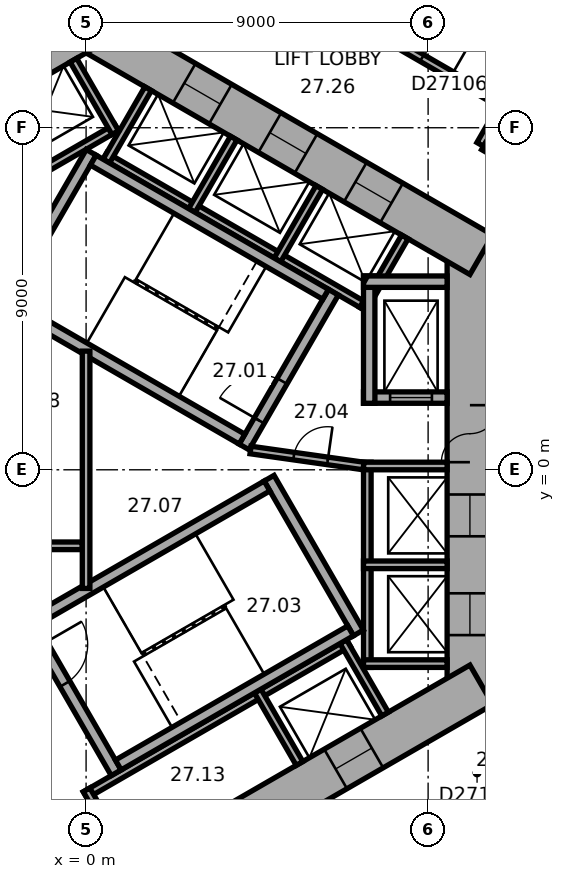
"""IFC4 building model, lengths in metres.
Left out: names, types, materials, properties, quantities, classifications, styles, units other than length and angle.
Written with IfcOpenShell. Run it as: python <this file> out.ifc"""

import sys

from ifc_helpers import new_model, si_unit, direction, frame, frame_2d, origin, place, context, subcontext, project, spatial, rectangle, extrude, element, fill, save


model = new_model("IFC4")
c1 = context("Model", 3, precision=1e-05, world=origin(), true_north=direction((0.0, 1.0)))
c2 = subcontext(c1, "Body", "Model", "MODEL_VIEW")
j1 = project(units=[si_unit("LENGTHUNIT", "METRE"), si_unit("PLANEANGLEUNIT", "RADIAN")], contexts=[c1])
p1 = place(None, origin())
s1 = spatial("IfcSite", under=j1, at=p1, CompositionType="ELEMENT")
p2 = place(p1, origin())
s2 = spatial("IfcBuilding", under=s1, at=p2, CompositionType="ELEMENT")
p3 = place(p2, frame((0.0, 0.0, 113.3)))
s3 = spatial("IfcBuildingStorey", under=s2, at=p3, CompositionType="ELEMENT", Elevation=113.3)
p4 = place(p3, frame((10.1, -6.177, 0.0), z_axis=(0.0, 0.0, 1.0), x_axis=(0.0, 1.0, 0.0)))
e1 = element("IfcWall", 1, at=p4, inside=s3, PredefinedType="SHEAR", context=c2, shape_type="SweptSolid", body=[
    extrude(rectangle(XDim=12.355, YDim=1.2, at=frame_2d((6.177, 0.0))), origin(), (0.0, 0.0, 1.0), 3.3),
])
p5 = place(p4, frame((6.378, 0.0, 0.0)))
e2 = element("IfcOpeningElement", 2, at=p5, cuts=e1, PredefinedType="OPENING", context=c2, shape_type="SweptSolid", body=[
    extrude(rectangle(XDim=1.5, YDim=2.1, at=frame_2d((0.75, 1.05))), frame((0.0, 0.61, 0.0), z_axis=(0.0, -1.0, 0.0), x_axis=(1.0, 0.0, 0.0)), (0.0, 0.0, 1.0), 1.22),
])
p6 = place(p4, frame((1.828, 0.0, 0.0)))
e3 = element("IfcOpeningElement", 3, at=p6, cuts=e1, PredefinedType="OPENING", context=c2, shape_type="SweptSolid", body=[
    extrude(rectangle(XDim=1.1, YDim=2.1, at=frame_2d((0.55, 1.05))), frame((0.0, 0.61, 0.0), z_axis=(0.0, -1.0, 0.0), x_axis=(1.0, 0.0, 0.0)), (0.0, 0.0, 1.0), 1.22),
])
p7 = place(p4, frame((4.427, 0.0, 0.0)))
e4 = element("IfcOpeningElement", 4, at=p7, cuts=e1, PredefinedType="OPENING", context=c2, shape_type="SweptSolid", body=[
    extrude(rectangle(XDim=1.1, YDim=2.1, at=frame_2d((0.55, 1.05))), frame((0.0, 0.61, 0.0), z_axis=(0.0, -1.0, 0.0), x_axis=(1.0, 0.0, 0.0)), (0.0, 0.0, 1.0), 1.22),
])
p8 = place(p3, frame((10.4, 5.658, 0.0), z_axis=(0.0, 0.0, 1.0), x_axis=(-0.866021384402, 0.500006961711, 0.0)))
e5 = element("IfcWall", 5, at=p8, inside=s3, PredefinedType="SHEAR", context=c2, shape_type="SweptSolid", body=[
    extrude(rectangle(XDim=12.355, YDim=1.2, at=frame_2d((6.178, 0.0))), origin(), (0.0, 0.0, 1.0), 3.3),
])
p9 = place(p8, frame((2.728, 0.0, 0.0)))
e6 = element("IfcOpeningElement", 6, at=p9, cuts=e5, PredefinedType="OPENING", context=c2, shape_type="SweptSolid", body=[
    extrude(rectangle(XDim=1.1, YDim=2.1, at=frame_2d((0.55, 1.05))), frame((0.0, 0.61, 0.0), z_axis=(0.0, -1.0, 0.0), x_axis=(1.0, 0.0, 0.0)), (0.0, 0.0, 1.0), 1.22),
])
p10 = place(p8, frame((5.328, 0.0, 0.0)))
e7 = element("IfcOpeningElement", 7, at=p10, cuts=e5, PredefinedType="OPENING", context=c2, shape_type="SweptSolid", body=[
    extrude(rectangle(XDim=1.1, YDim=2.1, at=frame_2d((0.55, 1.05))), frame((0.0, 0.61, 0.0), z_axis=(0.0, -1.0, 0.0), x_axis=(1.0, 0.0, 0.0)), (0.0, 0.0, 1.0), 1.22),
])
p11 = place(p8, frame((7.928, 0.0, 0.0)))
e8 = element("IfcOpeningElement", 8, at=p11, cuts=e5, PredefinedType="OPENING", context=c2, shape_type="SweptSolid", body=[
    extrude(rectangle(XDim=1.1, YDim=2.1, at=frame_2d((0.55, 1.05))), frame((0.0, 0.61, 0.0), z_axis=(0.0, -1.0, 0.0), x_axis=(1.0, 0.0, 0.0)), (0.0, 0.0, 1.0), 1.22),
])
p12 = place(p3, frame((0.3, 11.836, 0.0), z_axis=(0.0, 0.0, 1.0), x_axis=(-0.866021384402, -0.500006961711, 0.0)))
e9 = element("IfcWall", 9, at=p12, inside=s3, PredefinedType="SHEAR", context=c2, shape_type="SweptSolid", body=[
    extrude(rectangle(XDim=12.355, YDim=1.2, at=frame_2d((6.178, 0.0))), origin(), (0.0, 0.0, 1.0), 3.3),
])
p13 = place(p12, frame((6.378, 0.0, 0.0)))
e10 = element("IfcOpeningElement", 10, at=p13, cuts=e9, PredefinedType="OPENING", context=c2, shape_type="SweptSolid", body=[
    extrude(rectangle(XDim=1.5, YDim=2.1, at=frame_2d((0.75, 1.05))), frame((0.0, 0.61, 0.0), z_axis=(0.0, -1.0, 0.0), x_axis=(1.0, 0.0, 0.0)), (0.0, 0.0, 1.0), 1.22),
])
p14 = place(p12, frame((1.828, 0.0, 0.0)))
e11 = element("IfcOpeningElement", 11, at=p14, cuts=e9, PredefinedType="OPENING", context=c2, shape_type="SweptSolid", body=[
    extrude(rectangle(XDim=1.1, YDim=2.1, at=frame_2d((0.55, 1.05))), frame((0.0, 0.61, 0.0), z_axis=(0.0, -1.0, 0.0), x_axis=(1.0, 0.0, 0.0)), (0.0, 0.0, 1.0), 1.22),
])
p15 = place(p3, frame((-10.4, -5.658, 0.0), z_axis=(0.0, 0.0, 1.0), x_axis=(0.866021384402, -0.500006961711, 0.0)))
e12 = element("IfcWall", 12, at=p15, inside=s3, PredefinedType="SHEAR", context=c2, shape_type="SweptSolid", body=[
    extrude(rectangle(XDim=12.355, YDim=1.2, at=frame_2d((6.178, 0.0))), origin(), (0.0, 0.0, 1.0), 3.3),
])
p16 = place(p15, frame((6.378, 0.0, 0.0)))
e13 = element("IfcOpeningElement", 13, at=p16, cuts=e12, PredefinedType="OPENING", context=c2, shape_type="SweptSolid", body=[
    extrude(rectangle(XDim=1.5, YDim=2.1, at=frame_2d((0.75, 1.05))), frame((0.0, 0.61, 0.0), z_axis=(0.0, -1.0, 0.0), x_axis=(1.0, 0.0, 0.0)), (0.0, 0.0, 1.0), 1.22),
])
p17 = place(p15, frame((3.228, 0.0, 0.0)))
e14 = element("IfcOpeningElement", 14, at=p17, cuts=e12, PredefinedType="OPENING", context=c2, shape_type="SweptSolid", body=[
    extrude(rectangle(XDim=0.9, YDim=2.1, at=frame_2d((0.45, 1.05))), frame((0.0, 0.61, 0.0), z_axis=(0.0, -1.0, 0.0), x_axis=(1.0, 0.0, 0.0)), (0.0, 0.0, 1.0), 1.22),
])
p18 = place(p3, frame((-0.3, -11.836, 0.0), z_axis=(0.0, 0.0, 1.0), x_axis=(0.866021384402, 0.500006961711, 0.0)))
e15 = element("IfcWall", 15, at=p18, inside=s3, PredefinedType="SHEAR", context=c2, shape_type="SweptSolid", body=[
    extrude(rectangle(XDim=12.355, YDim=1.2, at=frame_2d((6.178, 0.0))), origin(), (0.0, 0.0, 1.0), 3.3),
])
p19 = place(p18, frame((4.128, 0.0, 0.0)))
e16 = element("IfcOpeningElement", 16, at=p19, cuts=e15, PredefinedType="OPENING", context=c2, shape_type="SweptSolid", body=[
    extrude(rectangle(XDim=0.9, YDim=2.1, at=frame_2d((0.45, 1.05))), frame((0.0, 0.61, 0.0), z_axis=(0.0, -1.0, 0.0), x_axis=(1.0, 0.0, 0.0)), (0.0, 0.0, 1.0), 1.22),
])
p20 = place(p18, frame((7.928, 0.0, 0.0)))
e17 = element("IfcOpeningElement", 17, at=p20, cuts=e15, PredefinedType="OPENING", context=c2, shape_type="SweptSolid", body=[
    extrude(rectangle(XDim=1.1, YDim=2.1, at=frame_2d((0.55, 1.05))), frame((0.0, 0.61, 0.0), z_axis=(0.0, -1.0, 0.0), x_axis=(1.0, 0.0, 0.0)), (0.0, 0.0, 1.0), 1.22),
])
p21 = place(p3, frame((7.4, -5.2, 0.0), z_axis=(0.0, 0.0, 1.0), x_axis=(0.0, 1.0, 0.0)))
e18 = element("IfcWall", 18, at=p21, inside=s3, PredefinedType="PARTITIONING", context=c2, shape_type="SweptSolid", body=[
    extrude(rectangle(XDim=5.4, YDim=0.2, at=frame_2d((2.7, 0.0))), origin(), (0.0, 0.0, 1.0), 3.05),
])
for number, where, z_axis, x_axis in (
    (19, (7.3, -5.1, 0.0), (0.0, 0.0, 1.0), (1.0, 0.0, 0.0)),
    (20, (7.3, -2.5, 0.0), (0.0, 0.0, 1.0), (1.0, 0.0, 0.0)),
    (21, (7.3, 0.1, 0.0), (0.0, 0.0, 1.0), (1.0, 0.0, 0.0)),
):
    element("IfcWall", number, at=place(p3, frame(where, z_axis=z_axis, x_axis=x_axis)), inside=s3, PredefinedType="PARTITIONING", context=c2, shape_type="SweptSolid", body=[
        extrude(rectangle(XDim=2.2, YDim=0.2, at=frame_2d((1.1, 0.0))), origin(), (0.0, 0.0, 1.0), 3.05),
    ])
p22 = place(p3, frame((7.424, 4.259, 0.0), z_axis=(0.0, 0.0, 1.0), x_axis=(-0.866026010844, 0.49999894854, 0.0)))
e22 = element("IfcWall", 22, at=p22, inside=s3, PredefinedType="PARTITIONING", context=c2, shape_type="SweptSolid", body=[
    extrude(rectangle(XDim=8.0, YDim=0.2, at=frame_2d((4.0, 0.0))), origin(), (0.0, 0.0, 1.0), 3.05),
])
for number, where, z_axis, x_axis in (
    (23, (7.287, 4.222, 0.0), (0.0, 0.0, 1.0), (0.5, 0.866, 0.0)),
    (24, (5.036, 5.522, 0.0), (0.0, 0.0, 1.0), (0.5, 0.866, 0.0)),
    (25, (2.784, 6.822, 0.0), (0.0, 0.0, 1.0), (0.5, 0.866, 0.0)),
    (26, (0.532, 8.122, 0.0), (0.0, 0.0, 1.0), (0.5, 0.866, 0.0)),
):
    element("IfcWall", number, at=place(p3, frame(where, z_axis=z_axis, x_axis=x_axis)), inside=s3, PredefinedType="PARTITIONING", context=c2, shape_type="SweptSolid", body=[
        extrude(rectangle(XDim=2.2, YDim=0.2, at=frame_2d((1.1, 0.0))), origin(), (0.0, 0.0, 1.0), 3.05),
    ])
p23 = place(p3, frame((0.803, 9.009, 0.0), z_axis=(0.0, 0.0, 1.0), x_axis=(-0.866028230842, -0.499995103361, 0.0)))
e27 = element("IfcWall", 27, at=p23, inside=s3, PredefinedType="PARTITIONING", context=c2, shape_type="SweptSolid", body=[
    extrude(rectangle(XDim=5.4, YDim=0.2, at=frame_2d((2.7, 0.0))), origin(), (0.0, 0.0, 1.0), 3.05),
])
p24 = place(p3, frame((0.767, 8.872, 0.0), z_axis=(0.0, 0.0, 1.0), x_axis=(-0.499994660107, 0.866028486751, 0.0)))
e28 = element("IfcWall", 28, at=p24, inside=s3, PredefinedType="PARTITIONING", context=c2, shape_type="SweptSolid", body=[
    extrude(rectangle(XDim=2.2, YDim=0.2, at=frame_2d((1.1, 0.0))), origin(), (0.0, 0.0, 1.0), 3.05),
])
p25 = place(p3, frame((-0.024, -8.559, 0.0), z_axis=(0.0, 0.0, 1.0), x_axis=(0.866026010844, 0.49999894854, 0.0)))
e29 = element("IfcWall", 29, at=p25, inside=s3, PredefinedType="PARTITIONING", context=c2, shape_type="SweptSolid", body=[
    extrude(rectangle(XDim=8.0, YDim=0.2, at=frame_2d((4.0, 0.0))), origin(), (0.0, 0.0, 1.0), 3.05),
])
for number, where, z_axis, x_axis in (
    (30, (0.013, -8.422, 0.0), (0.0, 0.0, 1.0), (0.5, -0.866, 0.0)),
    (31, (4.516, -5.822, 0.0), (0.0, 0.0, 1.0), (0.5, -0.866, 0.0)),
    (32, (6.768, -4.522, 0.0), (0.0, 0.0, 1.0), (0.5, -0.866, 0.0)),
):
    element("IfcWall", number, at=place(p3, frame(where, z_axis=z_axis, x_axis=x_axis)), inside=s3, PredefinedType="PARTITIONING", context=c2, shape_type="SweptSolid", body=[
        extrude(rectangle(XDim=2.2, YDim=0.2, at=frame_2d((1.1, 0.0))), origin(), (0.0, 0.0, 1.0), 3.05),
    ])
p26 = place(p3, frame((4.158, 0.602, 0.0), z_axis=(0.0, 0.0, 1.0), x_axis=(0.499977259774, 0.866038532462, 0.0)))
e33 = element("IfcWall", 33, at=p26, inside=s3, PredefinedType="SHEAR", context=c2, shape_type="SweptSolid", body=[
    extrude(rectangle(XDim=4.7, YDim=0.3, at=frame_2d((2.35, 0.0))), origin(), (0.0, 0.0, 1.0), 3.05),
])
p27 = place(p26, frame((0.8, 0.0, 0.0)))
e34 = element("IfcOpeningElement", 34, at=p27, cuts=e33, PredefinedType="OPENING", context=c2, shape_type="SweptSolid", body=[
    extrude(rectangle(XDim=1.2, YDim=2.1, at=frame_2d((0.6, 1.05))), frame((0.0, 0.16, 0.0), z_axis=(0.0, -1.0, 0.0), x_axis=(1.0, 0.0, 0.0)), (0.0, 0.0, 1.0), 0.32),
])
p28 = place(p3, frame((-2.216, 4.282, 0.0), z_axis=(0.0, 0.0, 1.0), x_axis=(0.499977259774, 0.866038532462, 0.0)))
e35 = element("IfcWall", 35, at=p28, inside=s3, PredefinedType="SHEAR", context=c2, shape_type="SweptSolid", body=[
    extrude(rectangle(XDim=4.7, YDim=0.3, at=frame_2d((2.35, 0.0))), origin(), (0.0, 0.0, 1.0), 3.05),
])
for number, where, z_axis, x_axis in (
    (36, (4.103, 0.807, 0.0), (0.0, 0.0, 1.0), (-0.866, 0.5, 0.0)),
    (37, (6.303, 4.617, 0.0), (0.0, 0.0, 1.0), (-0.866, 0.5, 0.0)),
):
    element("IfcWall", number, at=place(p3, frame(where, z_axis=z_axis, x_axis=x_axis)), inside=s3, PredefinedType="SHEAR", context=c2, shape_type="SweptSolid", body=[
        extrude(rectangle(XDim=7.06, YDim=0.3, at=frame_2d((3.53, 0.0))), origin(), (0.0, 0.0, 1.0), 3.05),
    ])
p29 = place(p3, frame((-1.558, -3.902, 0.0), z_axis=(0.0, 0.0, 1.0), x_axis=(0.499977259774, -0.866038532462, 0.0)))
e38 = element("IfcWall", 38, at=p29, inside=s3, PredefinedType="SHEAR", context=c2, shape_type="SweptSolid", body=[
    extrude(rectangle(XDim=4.7, YDim=0.3, at=frame_2d((2.35, 0.0))), origin(), (0.0, 0.0, 1.0), 3.05),
])
p30 = place(p29, frame((0.8, 0.0, 0.0)))
e39 = element("IfcOpeningElement", 39, at=p30, cuts=e38, PredefinedType="OPENING", context=c2, shape_type="SweptSolid", body=[
    extrude(rectangle(XDim=1.2, YDim=2.1, at=frame_2d((0.6, 1.05))), frame((0.0, 0.16, 0.0), z_axis=(0.0, -1.0, 0.0), x_axis=(1.0, 0.0, 0.0)), (0.0, 0.0, 1.0), 0.32),
])
p31 = place(p3, frame((4.816, -0.222, 0.0), z_axis=(0.0, 0.0, 1.0), x_axis=(0.499977259774, -0.866038532462, 0.0)))
e40 = element("IfcWall", 40, at=p31, inside=s3, PredefinedType="SHEAR", context=c2, shape_type="SweptSolid", body=[
    extrude(rectangle(XDim=4.7, YDim=0.3, at=frame_2d((2.35, 0.0))), origin(), (0.0, 0.0, 1.0), 3.05),
])
for number, where, z_axis, x_axis in (
    (41, (-1.353, -3.957, 0.0), (0.0, 0.0, 1.0), (0.866, 0.5, 0.0)),
    (42, (0.847, -7.767, 0.0), (0.0, 0.0, 1.0), (0.866, 0.5, 0.0)),
):
    element("IfcWall", number, at=place(p3, frame(where, z_axis=z_axis, x_axis=x_axis)), inside=s3, PredefinedType="SHEAR", context=c2, shape_type="SweptSolid", body=[
        extrude(rectangle(XDim=7.06, YDim=0.3, at=frame_2d((3.53, 0.0))), origin(), (0.0, 0.0, 1.0), 3.05),
    ])
p32 = place(p3, frame((7.3, 1.9, 0.0), z_axis=(0.0, 0.0, 1.0), x_axis=(1.0, 0.0, 0.0)))
e43 = element("IfcWall", 43, at=p32, inside=s3, PredefinedType="SHEAR", context=c2, shape_type="SweptSolid", body=[
    extrude(rectangle(XDim=2.2, YDim=0.3, at=frame_2d((1.1, 0.0))), origin(), (0.0, 0.0, 1.0), 3.05),
])
p33 = place(p32, frame((0.7, 0.0, 0.0)))
e44 = element("IfcOpeningElement", 44, at=p33, cuts=e43, PredefinedType="OPENING", context=c2, shape_type="SweptSolid", body=[
    extrude(rectangle(XDim=1.1, YDim=2.1, at=frame_2d((0.55, 1.05))), frame((0.0, 0.16, 0.0), z_axis=(0.0, -1.0, 0.0), x_axis=(1.0, 0.0, 0.0)), (0.0, 0.0, 1.0), 0.32),
])
p34 = place(p3, frame((7.45, 1.75, 0.0), z_axis=(0.0, 0.0, 1.0), x_axis=(0.0, 1.0, 0.0)))
e45 = element("IfcWall", 45, at=p34, inside=s3, PredefinedType="SHEAR", context=c2, shape_type="SweptSolid", body=[
    extrude(rectangle(XDim=3.35, YDim=0.3, at=frame_2d((1.675, 0.0))), origin(), (0.0, 0.0, 1.0), 3.05),
])
p35 = place(p3, frame((7.3, 4.95, 0.0), z_axis=(0.0, 0.0, 1.0), x_axis=(1.0, 0.0, 0.0)))
e46 = element("IfcWall", 46, at=p35, inside=s3, PredefinedType="SHEAR", context=c2, shape_type="SweptSolid", body=[
    extrude(rectangle(XDim=2.2, YDim=0.3, at=frame_2d((1.1, 0.0))), origin(), (0.0, 0.0, 1.0), 3.05),
])
p36 = place(p3, frame((4.327, 0.521, 0.0), z_axis=(0.0, 0.0, 1.0), x_axis=(0.990124376366, -0.14019172346, 0.0)))
e47 = element("IfcWall", 47, at=p36, inside=s3, PredefinedType="PARTITIONING", context=c2, shape_type="SweptSolid", body=[
    extrude(rectangle(XDim=3.002, YDim=0.2, at=frame_2d((1.501, 0.0))), origin(), (0.0, 0.0, 1.0), 3.05),
])
p37 = place(p36, frame((1.15, 0.0, 0.0)))
e48 = element("IfcOpeningElement", 48, at=p37, cuts=e47, PredefinedType="OPENING", context=c2, shape_type="SweptSolid", body=[
    extrude(rectangle(XDim=0.9, YDim=2.1, at=frame_2d((0.45, 1.05))), frame((0.0, 0.11, 0.0), z_axis=(0.0, -1.0, 0.0), x_axis=(1.0, 0.0, 0.0)), (0.0, 0.0, 1.0), 0.22),
])
p38 = place(p3, frame((-2.72, -2.0, 0.0), z_axis=(0.0, 0.0, 1.0), x_axis=(1.0, 0.0, 0.0)))
e49 = element("IfcWall", 49, at=p38, inside=s3, PredefinedType="PARTITIONING", context=c2, shape_type="SweptSolid", body=[
    extrude(rectangle(XDim=2.62, YDim=0.2, at=frame_2d((1.31, 0.0))), origin(), (0.0, 0.0, 1.0), 3.05),
])
p39 = place(p3, frame((0.0, -3.122, 0.0), z_axis=(0.0, 0.0, 1.0), x_axis=(0.0, 1.0, 0.0)))
e50 = element("IfcWall", 50, at=p39, inside=s3, PredefinedType="PARTITIONING", context=c2, shape_type="SweptSolid", body=[
    extrude(rectangle(XDim=6.245, YDim=0.2, at=frame_2d((3.122, 0.0))), origin(), (0.0, 0.0, 1.0), 3.05),
])
p40 = place(p3, frame((9.852, -8.861, 0.0), z_axis=(0.0, 0.0, 1.0), x_axis=(0.866013291437, 0.500020978615, 0.0)))
e51 = element("IfcWall", 51, at=p40, inside=s3, PredefinedType="PARTITIONING", context=c2, shape_type="SweptSolid", body=[
    extrude(rectangle(XDim=2.077, YDim=0.2, at=frame_2d((1.038, 0.0))), origin(), (0.0, 0.0, 1.0), 3.05),
])
p41 = place(p40, frame((0.372, 0.0, 0.0)))
e52 = element("IfcOpeningElement", 52, at=p41, cuts=e51, PredefinedType="OPENING", context=c2, shape_type="SweptSolid", body=[
    extrude(rectangle(XDim=0.9, YDim=2.1, at=frame_2d((0.45, 1.05))), frame((0.0, 0.11, 0.0), z_axis=(0.0, -1.0, 0.0), x_axis=(1.0, 0.0, 0.0)), (0.0, 0.0, 1.0), 0.22),
])
p42 = place(p3, frame((10.371, 8.561, 0.0), z_axis=(0.0, 0.0, 1.0), x_axis=(0.499986357472, 0.866033280158, 0.0)))
e53 = element("IfcWall", 53, at=p42, inside=s3, PredefinedType="PARTITIONING", context=c2, shape_type="SweptSolid", body=[
    extrude(rectangle(XDim=1.201, YDim=0.2, at=frame_2d((0.601, 0.0))), origin(), (0.0, 0.0, 1.0), 3.05),
])
p43 = place(p3, frame((10.885, 9.652, 0.0), z_axis=(0.0, 0.0, 1.0), x_axis=(-0.866033868542, 0.499985338323, 0.0)))
e54 = element("IfcWall", 54, at=p43, inside=s3, PredefinedType="PARTITIONING", context=c2, shape_type="SweptSolid", body=[
    extrude(rectangle(XDim=8.602, YDim=0.2, at=frame_2d((4.301, 0.0))), origin(), (0.0, 0.0, 1.0), 3.05),
])
p44 = place(p43, frame((1.464, 0.0, 0.0)))
e55 = element("IfcOpeningElement", 55, at=p44, cuts=e54, PredefinedType="OPENING", context=c2, shape_type="SweptSolid", body=[
    extrude(rectangle(XDim=0.9, YDim=2.1, at=frame_2d((0.45, 1.05))), frame((0.0, 0.11, 0.0), z_axis=(0.0, -1.0, 0.0), x_axis=(1.0, 0.0, 0.0)), (0.0, 0.0, 1.0), 0.22),
])
p45 = place(p43, frame((7.09, 0.0, 0.0)))
e56 = element("IfcOpeningElement", 56, at=p45, cuts=e54, PredefinedType="OPENING", context=c2, shape_type="SweptSolid", body=[
    extrude(rectangle(XDim=0.9, YDim=2.1, at=frame_2d((0.45, 1.05))), frame((0.0, 0.11, 0.0), z_axis=(0.0, -1.0, 0.0), x_axis=(1.0, 0.0, 0.0)), (0.0, 0.0, 1.0), 0.22),
])
p46 = place(p3, frame((11.566, 7.871, 0.0), z_axis=(0.0, 0.0, 1.0), x_axis=(-0.866004557827, 0.500036104519, 0.0)))
e57 = element("IfcWall", 57, at=p46, inside=s3, PredefinedType="PARTITIONING", context=c2, shape_type="SweptSolid", body=[
    extrude(rectangle(XDim=1.28, YDim=0.2, at=frame_2d((0.64, 0.0))), origin(), (0.0, 0.0, 1.0), 3.05),
])
p47 = place(p5, origin())
e58 = element("IfcDoor", 58, at=p47, inside=s3, OperationType="DOUBLE_DOOR_SINGLE_SWING", PredefinedType="DOOR", context=c2, shape_type="SweptSolid", body=[
    extrude(rectangle(XDim=1.5, YDim=2.1, at=frame_2d((0.75, 1.05))), frame((0.0, 0.025, 0.0), z_axis=(0.0, -1.0, 0.0), x_axis=(1.0, 0.0, 0.0)), (0.0, 0.0, 1.0), 0.05),
])
fill(e2, e58)
p48 = place(p27, origin())
e59 = element("IfcDoor", 59, at=p48, inside=s3, OperationType="SINGLE_SWING_RIGHT", PredefinedType="DOOR", context=c2, shape_type="SweptSolid", body=[
    extrude(rectangle(XDim=1.2, YDim=2.1, at=frame_2d((0.6, 1.05))), frame((0.0, 0.025, 0.0), z_axis=(0.0, -1.0, 0.0), x_axis=(1.0, 0.0, 0.0)), (0.0, 0.0, 1.0), 0.05),
])
fill(e34, e59)
p49 = place(p30, origin())
e60 = element("IfcDoor", 60, at=p49, inside=s3, OperationType="SINGLE_SWING_RIGHT", PredefinedType="DOOR", context=c2, shape_type="SweptSolid", body=[
    extrude(rectangle(XDim=1.2, YDim=2.1, at=frame_2d((0.6, 1.05))), frame((0.0, 0.025, 0.0), z_axis=(0.0, -1.0, 0.0), x_axis=(1.0, 0.0, 0.0)), (0.0, 0.0, 1.0), 0.05),
])
fill(e39, e60)
p50 = place(p37, origin())
e61 = element("IfcDoor", 61, at=p50, inside=s3, OperationType="SINGLE_SWING_LEFT", PredefinedType="DOOR", context=c2, shape_type="SweptSolid", body=[
    extrude(rectangle(XDim=0.9, YDim=2.1, at=frame_2d((0.45, 1.05))), frame((0.0, 0.025, 0.0), z_axis=(0.0, -1.0, 0.0), x_axis=(1.0, 0.0, 0.0)), (0.0, 0.0, 1.0), 0.05),
])
fill(e48, e61)
p51 = place(p33, origin())
e62 = element("IfcDoor", 62, at=p51, inside=s3, OperationType="DOUBLE_DOOR_SLIDING", PredefinedType="DOOR", context=c2, shape_type="SweptSolid", body=[
    extrude(rectangle(XDim=1.1, YDim=2.1, at=frame_2d((0.55, 1.05))), frame((0.0, 0.025, 0.0), z_axis=(0.0, -1.0, 0.0), x_axis=(1.0, 0.0, 0.0)), (0.0, 0.0, 1.0), 0.05),
])
fill(e44, e62)
p52 = place(p6, origin())
e63 = element("IfcDoor", 63, at=p52, inside=s3, OperationType="DOUBLE_DOOR_SLIDING", PredefinedType="DOOR", context=c2, shape_type="SweptSolid", body=[
    extrude(rectangle(XDim=1.1, YDim=2.1, at=frame_2d((0.55, 1.05))), frame((0.0, 0.025, 0.0), z_axis=(0.0, -1.0, 0.0), x_axis=(1.0, 0.0, 0.0)), (0.0, 0.0, 1.0), 0.05),
])
fill(e3, e63)
p53 = place(p7, origin())
e64 = element("IfcDoor", 64, at=p53, inside=s3, OperationType="DOUBLE_DOOR_SLIDING", PredefinedType="DOOR", context=c2, shape_type="SweptSolid", body=[
    extrude(rectangle(XDim=1.1, YDim=2.1, at=frame_2d((0.55, 1.05))), frame((0.0, 0.025, 0.0), z_axis=(0.0, -1.0, 0.0), x_axis=(1.0, 0.0, 0.0)), (0.0, 0.0, 1.0), 0.05),
])
fill(e4, e64)
p54 = place(p9, origin())
e65 = element("IfcDoor", 65, at=p54, inside=s3, OperationType="DOUBLE_DOOR_SLIDING", PredefinedType="DOOR", context=c2, shape_type="SweptSolid", body=[
    extrude(rectangle(XDim=1.1, YDim=2.1, at=frame_2d((0.55, 1.05))), frame((0.0, 0.025, 0.0), z_axis=(0.0, -1.0, 0.0), x_axis=(1.0, 0.0, 0.0)), (0.0, 0.0, 1.0), 0.05),
])
fill(e6, e65)
p55 = place(p10, origin())
e66 = element("IfcDoor", 66, at=p55, inside=s3, OperationType="DOUBLE_DOOR_SLIDING", PredefinedType="DOOR", context=c2, shape_type="SweptSolid", body=[
    extrude(rectangle(XDim=1.1, YDim=2.1, at=frame_2d((0.55, 1.05))), frame((0.0, 0.025, 0.0), z_axis=(0.0, -1.0, 0.0), x_axis=(1.0, 0.0, 0.0)), (0.0, 0.0, 1.0), 0.05),
])
fill(e7, e66)
p56 = place(p11, origin())
e67 = element("IfcDoor", 67, at=p56, inside=s3, OperationType="DOUBLE_DOOR_SLIDING", PredefinedType="DOOR", context=c2, shape_type="SweptSolid", body=[
    extrude(rectangle(XDim=1.1, YDim=2.1, at=frame_2d((0.55, 1.05))), frame((0.0, 0.025, 0.0), z_axis=(0.0, -1.0, 0.0), x_axis=(1.0, 0.0, 0.0)), (0.0, 0.0, 1.0), 0.05),
])
fill(e8, e67)
p57 = place(p20, origin())
e68 = element("IfcDoor", 68, at=p57, inside=s3, OperationType="DOUBLE_DOOR_SLIDING", PredefinedType="DOOR", context=c2, shape_type="SweptSolid", body=[
    extrude(rectangle(XDim=1.1, YDim=2.1, at=frame_2d((0.55, 1.05))), frame((0.0, 0.025, 0.0), z_axis=(0.0, -1.0, 0.0), x_axis=(1.0, 0.0, 0.0)), (0.0, 0.0, 1.0), 0.05),
])
fill(e17, e68)
p58 = place(p44, origin())
e69 = element("IfcDoor", 69, at=p58, inside=s3, OperationType="SINGLE_SWING_LEFT", PredefinedType="DOOR", context=c2, shape_type="SweptSolid", body=[
    extrude(rectangle(XDim=0.9, YDim=2.1, at=frame_2d((0.45, 1.05))), frame((0.0, 0.025, 0.0), z_axis=(0.0, -1.0, 0.0), x_axis=(1.0, 0.0, 0.0)), (0.0, 0.0, 1.0), 0.05),
])
fill(e55, e69)
p59 = place(p41, origin())
e70 = element("IfcDoor", 70, at=p59, inside=s3, OperationType="SINGLE_SWING_LEFT", PredefinedType="DOOR", context=c2, shape_type="SweptSolid", body=[
    extrude(rectangle(XDim=0.9, YDim=2.1, at=frame_2d((0.45, 1.05))), frame((0.0, 0.025, 0.0), z_axis=(0.0, -1.0, 0.0), x_axis=(1.0, 0.0, 0.0)), (0.0, 0.0, 1.0), 0.05),
])
fill(e52, e70)
save(model, sys.argv[1])
